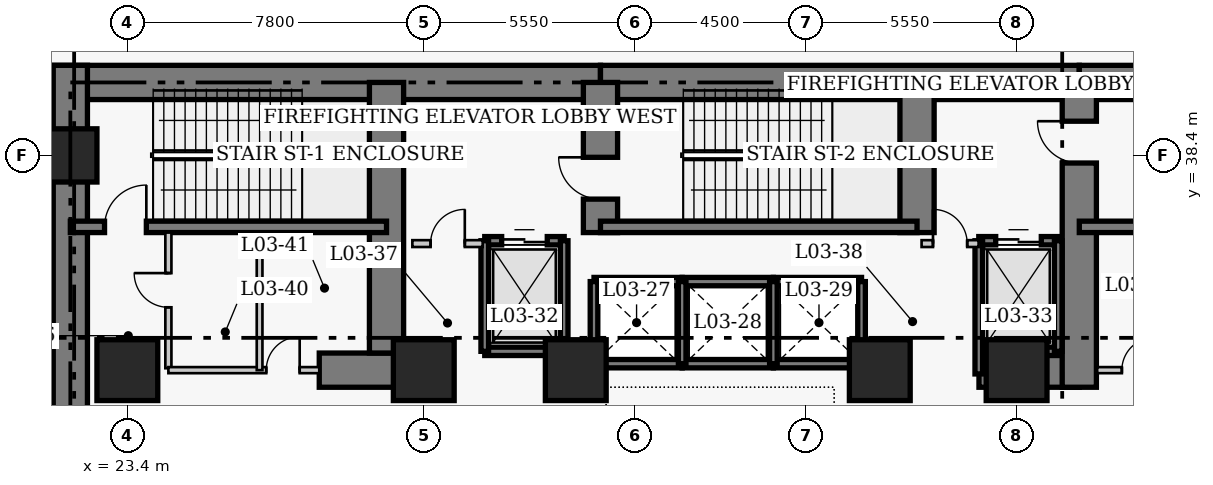
"""IFC4 building model, lengths in metres.
Left out: names, types, materials, properties, quantities, classifications, styles, units other than length and angle.
Written with IfcOpenShell. Run it as: python <this file> out.ifc"""

import sys

from ifc_helpers import new_model, si_unit, direction, frame, frame_2d, origin, origin_2d, place, context, subcontext, project, spatial, rectangle, extrude, element, fill, save


model = new_model("IFC4")
c1 = context("Model", 3, precision=1e-05, world=origin(), true_north=direction((0.0, 1.0)))
c2 = subcontext(c1, "Body", "Model", "MODEL_VIEW")
j1 = project(units=[si_unit("LENGTHUNIT", "METRE"), si_unit("PLANEANGLEUNIT", "RADIAN")], contexts=[c1])
p1 = place(None, origin())
s1 = spatial("IfcSite", under=j1, at=p1, CompositionType="ELEMENT")
p2 = place(p1, origin())
s2 = spatial("IfcBuilding", under=s1, at=p2, CompositionType="ELEMENT")
p3 = place(p2, frame((0.0, 0.0, 15.8)))
s3 = spatial("IfcBuildingStorey", under=s2, at=p3, CompositionType="ELEMENT", Elevation=15.8)
p4 = place(p3, frame((21.45, 40.32, 0.0), z_axis=(0.0, 0.0, 1.0), x_axis=(1.0, 0.0, 0.0)))
e1 = element("IfcWall", 1, at=p4, inside=s3, PredefinedType="SHEAR", context=c2, shape_type="SweptSolid", body=[
    extrude(rectangle(XDim=14.4, YDim=0.9, at=frame_2d((7.2, 0.0))), origin(), (0.0, 0.0, 1.0), 5.0),
])
p5 = place(p3, frame((35.85, 40.32, 0.0), z_axis=(0.0, 0.0, 1.0), x_axis=(1.0, 0.0, 0.0)))
e2 = element("IfcWall", 2, at=p5, inside=s3, PredefinedType="SHEAR", context=c2, shape_type="SweptSolid", body=[
    extrude(rectangle(XDim=12.6, YDim=0.9, at=frame_2d((6.3, 0.0))), origin(), (0.0, 0.0, 1.0), 5.0),
])
p6 = place(p3, frame((48.45, 40.32, 0.0), z_axis=(0.0, 0.0, 1.0), x_axis=(1.0, 0.0, 0.0)))
e3 = element("IfcWall", 3, at=p6, inside=s3, PredefinedType="SHEAR", context=c2, shape_type="SweptSolid", body=[
    extrude(rectangle(XDim=8.97, YDim=0.9, at=frame_2d((4.485, 0.0))), origin(), (0.0, 0.0, 1.0), 5.0),
])
p7 = place(p3, frame((21.9, 27.05, 0.0), z_axis=(0.0, 0.0, 1.0), x_axis=(0.0, 1.0, 0.0)))
e4 = element("IfcWall", 4, at=p7, inside=s3, PredefinedType="SHEAR", context=c2, shape_type="SweptSolid", body=[
    extrude(rectangle(XDim=13.72, YDim=0.9, at=frame_2d((6.86, 0.0))), origin(), (0.0, 0.0, 1.0), 5.0),
])
p8 = place(p3, frame((28.45, 32.75, 0.0), z_axis=(0.0, 0.0, 1.0), x_axis=(1.0, 0.0, 0.0)))
e5 = element("IfcWall", 5, at=p8, inside=s3, PredefinedType="SHEAR", context=c2, shape_type="SweptSolid", body=[
    extrude(rectangle(XDim=2.4, YDim=0.9, at=frame_2d((1.2, 0.0))), origin(), (0.0, 0.0, 1.0), 5.0),
])
p9 = place(p3, frame((45.81, 32.75, 0.0), z_axis=(0.0, 0.0, 1.0), x_axis=(1.0, 0.0, 0.0)))
e6 = element("IfcWall", 6, at=p9, inside=s3, PredefinedType="SHEAR", context=c2, shape_type="SweptSolid", body=[
    extrude(rectangle(XDim=2.64, YDim=0.9, at=frame_2d((1.32, 0.0))), origin(), (0.0, 0.0, 1.0), 5.0),
])
p10 = place(p3, frame((30.22, 33.2, 0.0), z_axis=(0.0, 0.0, 1.0), x_axis=(0.0, 1.0, 0.0)))
e7 = element("IfcWall", 7, at=p10, inside=s3, PredefinedType="SHEAR", context=c2, shape_type="SweptSolid", body=[
    extrude(rectangle(XDim=7.12, YDim=0.9, at=frame_2d((3.56, 0.0))), origin(), (0.0, 0.0, 1.0), 5.0),
])
p11 = place(p3, frame((35.85, 36.37, 0.0), z_axis=(0.0, 0.0, 1.0), x_axis=(0.0, 1.0, 0.0)))
e8 = element("IfcWall", 8, at=p11, inside=s3, PredefinedType="SHEAR", context=c2, shape_type="SweptSolid", body=[
    extrude(rectangle(XDim=3.95, YDim=0.9, at=frame_2d((1.975, 0.0))), origin(), (0.0, 0.0, 1.0), 5.0),
])
p12 = place(p11, frame((0.88, 0.0, 0.0)))
e9 = element("IfcOpeningElement", 9, at=p12, cuts=e8, PredefinedType="OPENING", context=c2, shape_type="SweptSolid", body=[
    extrude(rectangle(XDim=1.1, YDim=2.15, at=frame_2d((0.55, 1.075))), frame((0.0, 0.46, 0.0), z_axis=(0.0, -1.0, 0.0), x_axis=(1.0, 0.0, 0.0)), (0.0, 0.0, 1.0), 0.92),
])
p13 = place(p3, frame((44.18, 36.37, 0.0), z_axis=(0.0, 0.0, 1.0), x_axis=(0.0, 1.0, 0.0)))
e10 = element("IfcWall", 10, at=p13, inside=s3, PredefinedType="SHEAR", context=c2, shape_type="SweptSolid", body=[
    extrude(rectangle(XDim=3.95, YDim=0.9, at=frame_2d((1.975, 0.0))), origin(), (0.0, 0.0, 1.0), 5.0),
])
p14 = place(p3, frame((48.45, 32.3, 0.0), z_axis=(0.0, 0.0, 1.0), x_axis=(0.0, 1.0, 0.0)))
e11 = element("IfcWall", 11, at=p14, inside=s3, PredefinedType="SHEAR", context=c2, shape_type="SweptSolid", body=[
    extrude(rectangle(XDim=8.02, YDim=0.9, at=frame_2d((4.01, 0.0))), origin(), (0.0, 0.0, 1.0), 5.0),
])
p15 = place(p14, frame((5.9, 0.0, 0.0)))
e12 = element("IfcOpeningElement", 12, at=p15, cuts=e11, PredefinedType="OPENING", context=c2, shape_type="SweptSolid", body=[
    extrude(rectangle(XDim=1.1, YDim=2.15, at=frame_2d((0.55, 1.075))), frame((0.0, 0.46, 0.0), z_axis=(0.0, -1.0, 0.0), x_axis=(1.0, 0.0, 0.0)), (0.0, 0.0, 1.0), 0.92),
])
p16 = place(p3, frame((21.9, 36.52, 0.0), z_axis=(0.0, 0.0, 1.0), x_axis=(1.0, 0.0, 0.0)))
e13 = element("IfcWall", 13, at=p16, inside=s3, PredefinedType="SHEAR", context=c2, shape_type="SweptSolid", body=[
    extrude(rectangle(XDim=8.32, YDim=0.3, at=frame_2d((4.16, 0.0))), origin(), (0.0, 0.0, 1.0), 5.0),
])
p17 = place(p16, frame((0.9, 0.0, 0.0)))
e14 = element("IfcOpeningElement", 14, at=p17, cuts=e13, PredefinedType="OPENING", context=c2, shape_type="SweptSolid", body=[
    extrude(rectangle(XDim=1.1, YDim=2.15, at=frame_2d((0.55, 1.075))), frame((0.0, 0.16, 0.0), z_axis=(0.0, -1.0, 0.0), x_axis=(1.0, 0.0, 0.0)), (0.0, 0.0, 1.0), 0.32),
])
p18 = place(p3, frame((35.85, 36.52, 0.0), z_axis=(0.0, 0.0, 1.0), x_axis=(1.0, 0.0, 0.0)))
e15 = element("IfcWall", 15, at=p18, inside=s3, PredefinedType="SHEAR", context=c2, shape_type="SweptSolid", body=[
    extrude(rectangle(XDim=8.33, YDim=0.3, at=frame_2d((4.165, 0.0))), origin(), (0.0, 0.0, 1.0), 5.0),
])
p19 = place(p3, frame((48.45, 36.52, 0.0), z_axis=(0.0, 0.0, 1.0), x_axis=(1.0, 0.0, 0.0)))
e16 = element("IfcWall", 16, at=p19, inside=s3, PredefinedType="SHEAR", context=c2, shape_type="SweptSolid", body=[
    extrude(rectangle(XDim=8.52, YDim=0.3, at=frame_2d((4.26, 0.0))), origin(), (0.0, 0.0, 1.0), 5.0),
])
p20 = place(p3, frame((21.9, 38.4, 0.0), z_axis=(0.0, 0.0, 1.0), x_axis=(1.0, 0.0, 0.0)))
e17 = element("IfcColumn", 17, at=p20, inside=s3, PredefinedType="COLUMN", context=c2, shape_type="SweptSolid", body=[
    extrude(rectangle(XDim=1.4, YDim=1.4, at=origin_2d()), origin(), (0.0, 0.0, 1.0), 5.0),
])
for number, where, z_axis, x_axis in (
    (18, (23.4, 32.75, 0.0), (0.0, 0.0, 1.0), (1.0, 0.0, 0.0)),
    (19, (31.2, 32.75, 0.0), (0.0, 0.0, 1.0), (1.0, 0.0, 0.0)),
    (20, (35.2, 32.75, 0.0), (0.0, 0.0, 1.0), (1.0, 0.0, 0.0)),
    (21, (43.2, 32.75, 0.0), (0.0, 0.0, 1.0), (1.0, 0.0, 0.0)),
    (22, (46.8, 32.75, 0.0), (0.0, 0.0, 1.0), (1.0, 0.0, 0.0)),
):
    element("IfcColumn", number, at=place(p3, frame(where, z_axis=z_axis, x_axis=x_axis)), inside=s3, PredefinedType="COLUMN", context=c2, shape_type="SweptSolid", body=[
        extrude(rectangle(XDim=1.6, YDim=1.6, at=origin_2d()), origin(), (0.0, 0.0, 1.0), 5.0),
    ])
for number, where, z_axis, x_axis in (
    (23, (35.68, 35.08, 0.0), (0.0, 0.0, 1.0), (1.0, 0.0, 0.0)),
    (24, (35.68, 32.92, 0.0), (0.0, 0.0, 1.0), (1.0, 0.0, 0.0)),
):
    element("IfcWall", number, at=place(p3, frame(where, z_axis=z_axis, x_axis=x_axis)), inside=s3, PredefinedType="SHEAR", context=c2, shape_type="SweptSolid", body=[
        extrude(rectangle(XDim=2.32, YDim=0.22, at=frame_2d((1.16, 0.0))), origin(), (0.0, 0.0, 1.0), 5.0),
    ])
p21 = place(p3, frame((35.68, 32.92, 0.0), z_axis=(0.0, 0.0, 1.0), x_axis=(0.0, 1.0, 0.0)))
e25 = element("IfcWall", 25, at=p21, inside=s3, PredefinedType="SHEAR", context=c2, shape_type="SweptSolid", body=[
    extrude(rectangle(XDim=2.16, YDim=0.2, at=frame_2d((1.08, 0.0))), origin(), (0.0, 0.0, 1.0), 5.0),
])
for number, where, z_axis, x_axis in (
    (26, (38.0, 35.08, 0.0), (0.0, 0.0, 1.0), (1.0, 0.0, 0.0)),
    (27, (38.0, 32.92, 0.0), (0.0, 0.0, 1.0), (1.0, 0.0, 0.0)),
):
    element("IfcWall", number, at=place(p3, frame(where, z_axis=z_axis, x_axis=x_axis)), inside=s3, PredefinedType="SHEAR", context=c2, shape_type="SweptSolid", body=[
        extrude(rectangle(XDim=2.4, YDim=0.22, at=frame_2d((1.2, 0.0))), origin(), (0.0, 0.0, 1.0), 5.0),
    ])
p22 = place(p3, frame((38.0, 32.92, 0.0), z_axis=(0.0, 0.0, 1.0), x_axis=(0.0, 1.0, 0.0)))
e28 = element("IfcWall", 28, at=p22, inside=s3, PredefinedType="SHEAR", context=c2, shape_type="SweptSolid", body=[
    extrude(rectangle(XDim=2.16, YDim=0.2, at=frame_2d((1.08, 0.0))), origin(), (0.0, 0.0, 1.0), 5.0),
])
for number, where, z_axis, x_axis in (
    (29, (40.4, 35.08, 0.0), (0.0, 0.0, 1.0), (1.0, 0.0, 0.0)),
    (30, (40.4, 32.92, 0.0), (0.0, 0.0, 1.0), (1.0, 0.0, 0.0)),
):
    element("IfcWall", number, at=place(p3, frame(where, z_axis=z_axis, x_axis=x_axis)), inside=s3, PredefinedType="SHEAR", context=c2, shape_type="SweptSolid", body=[
        extrude(rectangle(XDim=2.32, YDim=0.22, at=frame_2d((1.16, 0.0))), origin(), (0.0, 0.0, 1.0), 5.0),
    ])
for number, where, z_axis, x_axis in (
    (31, (40.4, 32.92, 0.0), (0.0, 0.0, 1.0), (0.0, 1.0, 0.0)),
    (32, (42.72, 32.92, 0.0), (0.0, 0.0, 1.0), (0.0, 1.0, 0.0)),
):
    element("IfcWall", number, at=place(p3, frame(where, z_axis=z_axis, x_axis=x_axis)), inside=s3, PredefinedType="SHEAR", context=c2, shape_type="SweptSolid", body=[
        extrude(rectangle(XDim=2.16, YDim=0.2, at=frame_2d((1.08, 0.0))), origin(), (0.0, 0.0, 1.0), 5.0),
    ])
p23 = place(p3, frame((32.805, 36.155, 0.0), z_axis=(0.0, 0.0, 1.0), x_axis=(1.0, 0.0, 0.0)))
e33 = element("IfcWall", 33, at=p23, inside=s3, PredefinedType="SHEAR", context=c2, shape_type="SweptSolid", body=[
    extrude(rectangle(XDim=2.09, YDim=0.22, at=frame_2d((1.045, 0.0))), origin(), (0.0, 0.0, 1.0), 5.0),
])
p24 = place(p23, frame((0.445, 0.0, 0.0)))
e34 = element("IfcOpeningElement", 34, at=p24, cuts=e33, PredefinedType="OPENING", context=c2, shape_type="SweptSolid", body=[
    extrude(rectangle(XDim=1.2, YDim=2.15, at=frame_2d((0.6, 1.075))), frame((0.0, 0.12, 0.0), z_axis=(0.0, -1.0, 0.0), x_axis=(1.0, 0.0, 0.0)), (0.0, 0.0, 1.0), 0.24),
])
p25 = place(p3, frame((32.805, 33.245, 0.0), z_axis=(0.0, 0.0, 1.0), x_axis=(1.0, 0.0, 0.0)))
e35 = element("IfcWall", 35, at=p25, inside=s3, PredefinedType="SHEAR", context=c2, shape_type="SweptSolid", body=[
    extrude(rectangle(XDim=2.09, YDim=0.22, at=frame_2d((1.045, 0.0))), origin(), (0.0, 0.0, 1.0), 5.0),
])
for number, where, z_axis, x_axis in (
    (36, (32.805, 33.245, 0.0), (0.0, 0.0, 1.0), (0.0, 1.0, 0.0)),
    (37, (34.895, 33.245, 0.0), (0.0, 0.0, 1.0), (0.0, 1.0, 0.0)),
):
    element("IfcWall", number, at=place(p3, frame(where, z_axis=z_axis, x_axis=x_axis)), inside=s3, PredefinedType="SHEAR", context=c2, shape_type="SweptSolid", body=[
        extrude(rectangle(XDim=2.91, YDim=0.2, at=frame_2d((1.455, 0.0))), origin(), (0.0, 0.0, 1.0), 5.0),
    ])
p26 = place(p3, frame((45.805, 36.155, 0.0), z_axis=(0.0, 0.0, 1.0), x_axis=(1.0, 0.0, 0.0)))
e38 = element("IfcWall", 38, at=p26, inside=s3, PredefinedType="SHEAR", context=c2, shape_type="SweptSolid", body=[
    extrude(rectangle(XDim=2.09, YDim=0.22, at=frame_2d((1.045, 0.0))), origin(), (0.0, 0.0, 1.0), 5.0),
])
p27 = place(p26, frame((0.445, 0.0, 0.0)))
e39 = element("IfcOpeningElement", 39, at=p27, cuts=e38, PredefinedType="OPENING", context=c2, shape_type="SweptSolid", body=[
    extrude(rectangle(XDim=1.2, YDim=2.15, at=frame_2d((0.6, 1.075))), frame((0.0, 0.12, 0.0), z_axis=(0.0, -1.0, 0.0), x_axis=(1.0, 0.0, 0.0)), (0.0, 0.0, 1.0), 0.24),
])
p28 = place(p3, frame((45.805, 33.245, 0.0), z_axis=(0.0, 0.0, 1.0), x_axis=(1.0, 0.0, 0.0)))
e40 = element("IfcWall", 40, at=p28, inside=s3, PredefinedType="SHEAR", context=c2, shape_type="SweptSolid", body=[
    extrude(rectangle(XDim=2.09, YDim=0.22, at=frame_2d((1.045, 0.0))), origin(), (0.0, 0.0, 1.0), 5.0),
])
p29 = place(p3, frame((45.805, 32.65, 0.0), z_axis=(0.0, 0.0, 1.0), x_axis=(0.0, 1.0, 0.0)))
e41 = element("IfcWall", 41, at=p29, inside=s3, PredefinedType="SHEAR", context=c2, shape_type="SweptSolid", body=[
    extrude(rectangle(XDim=3.505, YDim=0.2, at=frame_2d((1.752, 0.0))), origin(), (0.0, 0.0, 1.0), 5.0),
])
p30 = place(p3, frame((47.895, 33.245, 0.0), z_axis=(0.0, 0.0, 1.0), x_axis=(0.0, 1.0, 0.0)))
e42 = element("IfcWall", 42, at=p30, inside=s3, PredefinedType="SHEAR", context=c2, shape_type="SweptSolid", body=[
    extrude(rectangle(XDim=2.91, YDim=0.2, at=frame_2d((1.455, 0.0))), origin(), (0.0, 0.0, 1.0), 5.0),
])
p31 = place(p3, frame((30.9, 36.08, 0.0), z_axis=(0.0, 0.0, 1.0), x_axis=(1.0, 0.0, 0.0)))
e43 = element("IfcWall", 43, at=p31, inside=s3, PredefinedType="PARTITIONING", context=c2, shape_type="SweptSolid", body=[
    extrude(rectangle(XDim=1.85, YDim=0.18, at=frame_2d((0.925, 0.0))), origin(), (0.0, 0.0, 1.0), 4.58),
])
p32 = place(p31, frame((0.48, 0.0, 0.0)))
e44 = element("IfcOpeningElement", 44, at=p32, cuts=e43, PredefinedType="OPENING", context=c2, shape_type="SweptSolid", body=[
    extrude(rectangle(XDim=0.9, YDim=2.15, at=frame_2d((0.45, 1.075))), frame((0.0, 0.1, 0.0), z_axis=(0.0, -1.0, 0.0), x_axis=(1.0, 0.0, 0.0)), (0.0, 0.0, 1.0), 0.2),
])
p33 = place(p3, frame((44.3, 36.08, 0.0), z_axis=(0.0, 0.0, 1.0), x_axis=(1.0, 0.0, 0.0)))
e45 = element("IfcWall", 45, at=p33, inside=s3, PredefinedType="PARTITIONING", context=c2, shape_type="SweptSolid", body=[
    extrude(rectangle(XDim=1.5, YDim=0.18, at=frame_2d((0.75, 0.0))), origin(), (0.0, 0.0, 1.0), 4.58),
])
p34 = place(p33, frame((0.3, 0.0, 0.0)))
e46 = element("IfcOpeningElement", 46, at=p34, cuts=e45, PredefinedType="OPENING", context=c2, shape_type="SweptSolid", body=[
    extrude(rectangle(XDim=0.9, YDim=2.15, at=frame_2d((0.45, 1.075))), frame((0.0, 0.1, 0.0), z_axis=(0.0, -1.0, 0.0), x_axis=(1.0, 0.0, 0.0)), (0.0, 0.0, 1.0), 0.2),
])
p35 = place(p3, frame((24.48, 32.8, 0.0), z_axis=(0.0, 0.0, 1.0), x_axis=(0.0, 1.0, 0.0)))
e47 = element("IfcWall", 47, at=p35, inside=s3, PredefinedType="PARTITIONING", context=c2, shape_type="SweptSolid", body=[
    extrude(rectangle(XDim=3.57, YDim=0.16, at=frame_2d((1.785, 0.0))), origin(), (0.0, 0.0, 1.0), 4.58),
])
p36 = place(p35, frame((1.604, 0.0, 0.0)))
e48 = element("IfcOpeningElement", 48, at=p36, cuts=e47, PredefinedType="OPENING", context=c2, shape_type="SweptSolid", body=[
    extrude(rectangle(XDim=0.9, YDim=2.1, at=frame_2d((0.45, 1.05))), frame((0.0, 0.09, 0.0), z_axis=(0.0, -1.0, 0.0), x_axis=(1.0, 0.0, 0.0)), (0.0, 0.0, 1.0), 0.18),
])
p37 = place(p3, frame((24.48, 32.75, 0.0), z_axis=(0.0, 0.0, 1.0), x_axis=(1.0, 0.0, 0.0)))
e49 = element("IfcWall", 49, at=p37, inside=s3, PredefinedType="PARTITIONING", context=c2, shape_type="SweptSolid", body=[
    extrude(rectangle(XDim=3.97, YDim=0.16, at=frame_2d((1.985, 0.0))), origin(), (0.0, 0.0, 1.0), 4.58),
])
p38 = place(p37, frame((2.575, 0.0, 0.0)))
e50 = element("IfcOpeningElement", 50, at=p38, cuts=e49, PredefinedType="OPENING", context=c2, shape_type="SweptSolid", body=[
    extrude(rectangle(XDim=0.88, YDim=2.05, at=frame_2d((0.44, 1.025))), frame((0.0, 0.09, 0.0), z_axis=(0.0, -1.0, 0.0), x_axis=(1.0, 0.0, 0.0)), (0.0, 0.0, 1.0), 0.18),
])
p39 = place(p3, frame((48.92, 32.75, 0.0), z_axis=(0.0, 0.0, 1.0), x_axis=(1.0, 0.0, 0.0)))
e51 = element("IfcWall", 51, at=p39, inside=s3, PredefinedType="PARTITIONING", context=c2, shape_type="SweptSolid", body=[
    extrude(rectangle(XDim=2.2, YDim=0.16, at=frame_2d((1.1, 0.0))), origin(), (0.0, 0.0, 1.0), 4.58),
])
p40 = place(p39, frame((0.65, 0.0, 0.0)))
e52 = element("IfcOpeningElement", 52, at=p40, cuts=e51, PredefinedType="OPENING", context=c2, shape_type="SweptSolid", body=[
    extrude(rectangle(XDim=0.86, YDim=2.05, at=frame_2d((0.43, 1.025))), frame((0.0, 0.09, 0.0), z_axis=(0.0, -1.0, 0.0), x_axis=(1.0, 0.0, 0.0)), (0.0, 0.0, 1.0), 0.18),
])
p41 = place(p3, frame((26.88, 32.75, 0.0), z_axis=(0.0, 0.0, 1.0), x_axis=(0.0, 1.0, 0.0)))
e53 = element("IfcWall", 53, at=p41, inside=s3, PredefinedType="PARTITIONING", context=c2, shape_type="SweptSolid", body=[
    extrude(rectangle(XDim=3.62, YDim=0.15, at=frame_2d((1.81, 0.0))), origin(), (0.0, 0.0, 1.0), 4.58),
])
p42 = place(p24, origin())
e54 = element("IfcDoor", 54, at=p42, inside=s3, OperationType="DOUBLE_DOOR_SLIDING", PredefinedType="DOOR", context=c2, shape_type="SweptSolid", body=[
    extrude(rectangle(XDim=1.2, YDim=2.15, at=frame_2d((0.6, 1.075))), frame((0.0, 0.025, 0.0), z_axis=(0.0, -1.0, 0.0), x_axis=(1.0, 0.0, 0.0)), (0.0, 0.0, 1.0), 0.05),
])
fill(e34, e54)
p43 = place(p27, origin())
e55 = element("IfcDoor", 55, at=p43, inside=s3, OperationType="DOUBLE_DOOR_SLIDING", PredefinedType="DOOR", context=c2, shape_type="SweptSolid", body=[
    extrude(rectangle(XDim=1.2, YDim=2.15, at=frame_2d((0.6, 1.075))), frame((0.0, 0.025, 0.0), z_axis=(0.0, -1.0, 0.0), x_axis=(1.0, 0.0, 0.0)), (0.0, 0.0, 1.0), 0.05),
])
fill(e39, e55)
p44 = place(p32, origin())
e56 = element("IfcDoor", 56, at=p44, inside=s3, OperationType="SINGLE_SWING_RIGHT", PredefinedType="DOOR", context=c2, shape_type="SweptSolid", body=[
    extrude(rectangle(XDim=0.9, YDim=2.15, at=frame_2d((0.45, 1.075))), frame((0.0, 0.025, 0.0), z_axis=(0.0, -1.0, 0.0), x_axis=(1.0, 0.0, 0.0)), (0.0, 0.0, 1.0), 0.05),
])
fill(e44, e56)
p45 = place(p34, origin())
e57 = element("IfcDoor", 57, at=p45, inside=s3, OperationType="SINGLE_SWING_LEFT", PredefinedType="DOOR", context=c2, shape_type="SweptSolid", body=[
    extrude(rectangle(XDim=0.9, YDim=2.15, at=frame_2d((0.45, 1.075))), frame((0.0, 0.025, 0.0), z_axis=(0.0, -1.0, 0.0), x_axis=(1.0, 0.0, 0.0)), (0.0, 0.0, 1.0), 0.05),
])
fill(e46, e57)
p46 = place(p36, origin())
e58 = element("IfcDoor", 58, at=p46, inside=s3, OperationType="SINGLE_SWING_RIGHT", PredefinedType="DOOR", context=c2, shape_type="SweptSolid", body=[
    extrude(rectangle(XDim=0.9, YDim=2.1, at=frame_2d((0.45, 1.05))), frame((0.0, 0.025, 0.0), z_axis=(0.0, -1.0, 0.0), x_axis=(1.0, 0.0, 0.0)), (0.0, 0.0, 1.0), 0.05),
])
fill(e48, e58)
p47 = place(p38, origin())
e59 = element("IfcDoor", 59, at=p47, inside=s3, OperationType="SINGLE_SWING_RIGHT", PredefinedType="DOOR", context=c2, shape_type="SweptSolid", body=[
    extrude(rectangle(XDim=0.88, YDim=2.05, at=frame_2d((0.44, 1.025))), frame((0.0, 0.025, 0.0), z_axis=(0.0, -1.0, 0.0), x_axis=(1.0, 0.0, 0.0)), (0.0, 0.0, 1.0), 0.05),
])
fill(e50, e59)
p48 = place(p40, origin())
e60 = element("IfcDoor", 60, at=p48, inside=s3, OperationType="SINGLE_SWING_RIGHT", PredefinedType="DOOR", context=c2, shape_type="SweptSolid", body=[
    extrude(rectangle(XDim=0.86, YDim=2.05, at=frame_2d((0.43, 1.025))), frame((0.0, 0.025, 0.0), z_axis=(0.0, -1.0, 0.0), x_axis=(1.0, 0.0, 0.0)), (0.0, 0.0, 1.0), 0.05),
])
fill(e52, e60)
p49 = place(p17, origin())
e61 = element("IfcDoor", 61, at=p49, inside=s3, OperationType="SINGLE_SWING_RIGHT", PredefinedType="DOOR", context=c2, shape_type="SweptSolid", body=[
    extrude(rectangle(XDim=1.1, YDim=2.15, at=frame_2d((0.55, 1.075))), frame((0.0, 0.025, 0.0), z_axis=(0.0, -1.0, 0.0), x_axis=(1.0, 0.0, 0.0)), (0.0, 0.0, 1.0), 0.05),
])
fill(e14, e61)
p50 = place(p12, origin())
e62 = element("IfcDoor", 62, at=p50, inside=s3, OperationType="SINGLE_SWING_RIGHT", PredefinedType="DOOR", context=c2, shape_type="SweptSolid", body=[
    extrude(rectangle(XDim=1.1, YDim=2.15, at=frame_2d((0.55, 1.075))), frame((0.0, 0.025, 0.0), z_axis=(0.0, -1.0, 0.0), x_axis=(1.0, 0.0, 0.0)), (0.0, 0.0, 1.0), 0.05),
])
fill(e9, e62)
p51 = place(p15, origin())
e63 = element("IfcDoor", 63, at=p51, inside=s3, OperationType="SINGLE_SWING_RIGHT", PredefinedType="DOOR", context=c2, shape_type="SweptSolid", body=[
    extrude(rectangle(XDim=1.1, YDim=2.15, at=frame_2d((0.55, 1.075))), frame((0.0, 0.025, 0.0), z_axis=(0.0, -1.0, 0.0), x_axis=(1.0, 0.0, 0.0)), (0.0, 0.0, 1.0), 0.05),
])
fill(e12, e63)
save(model, sys.argv[1])
